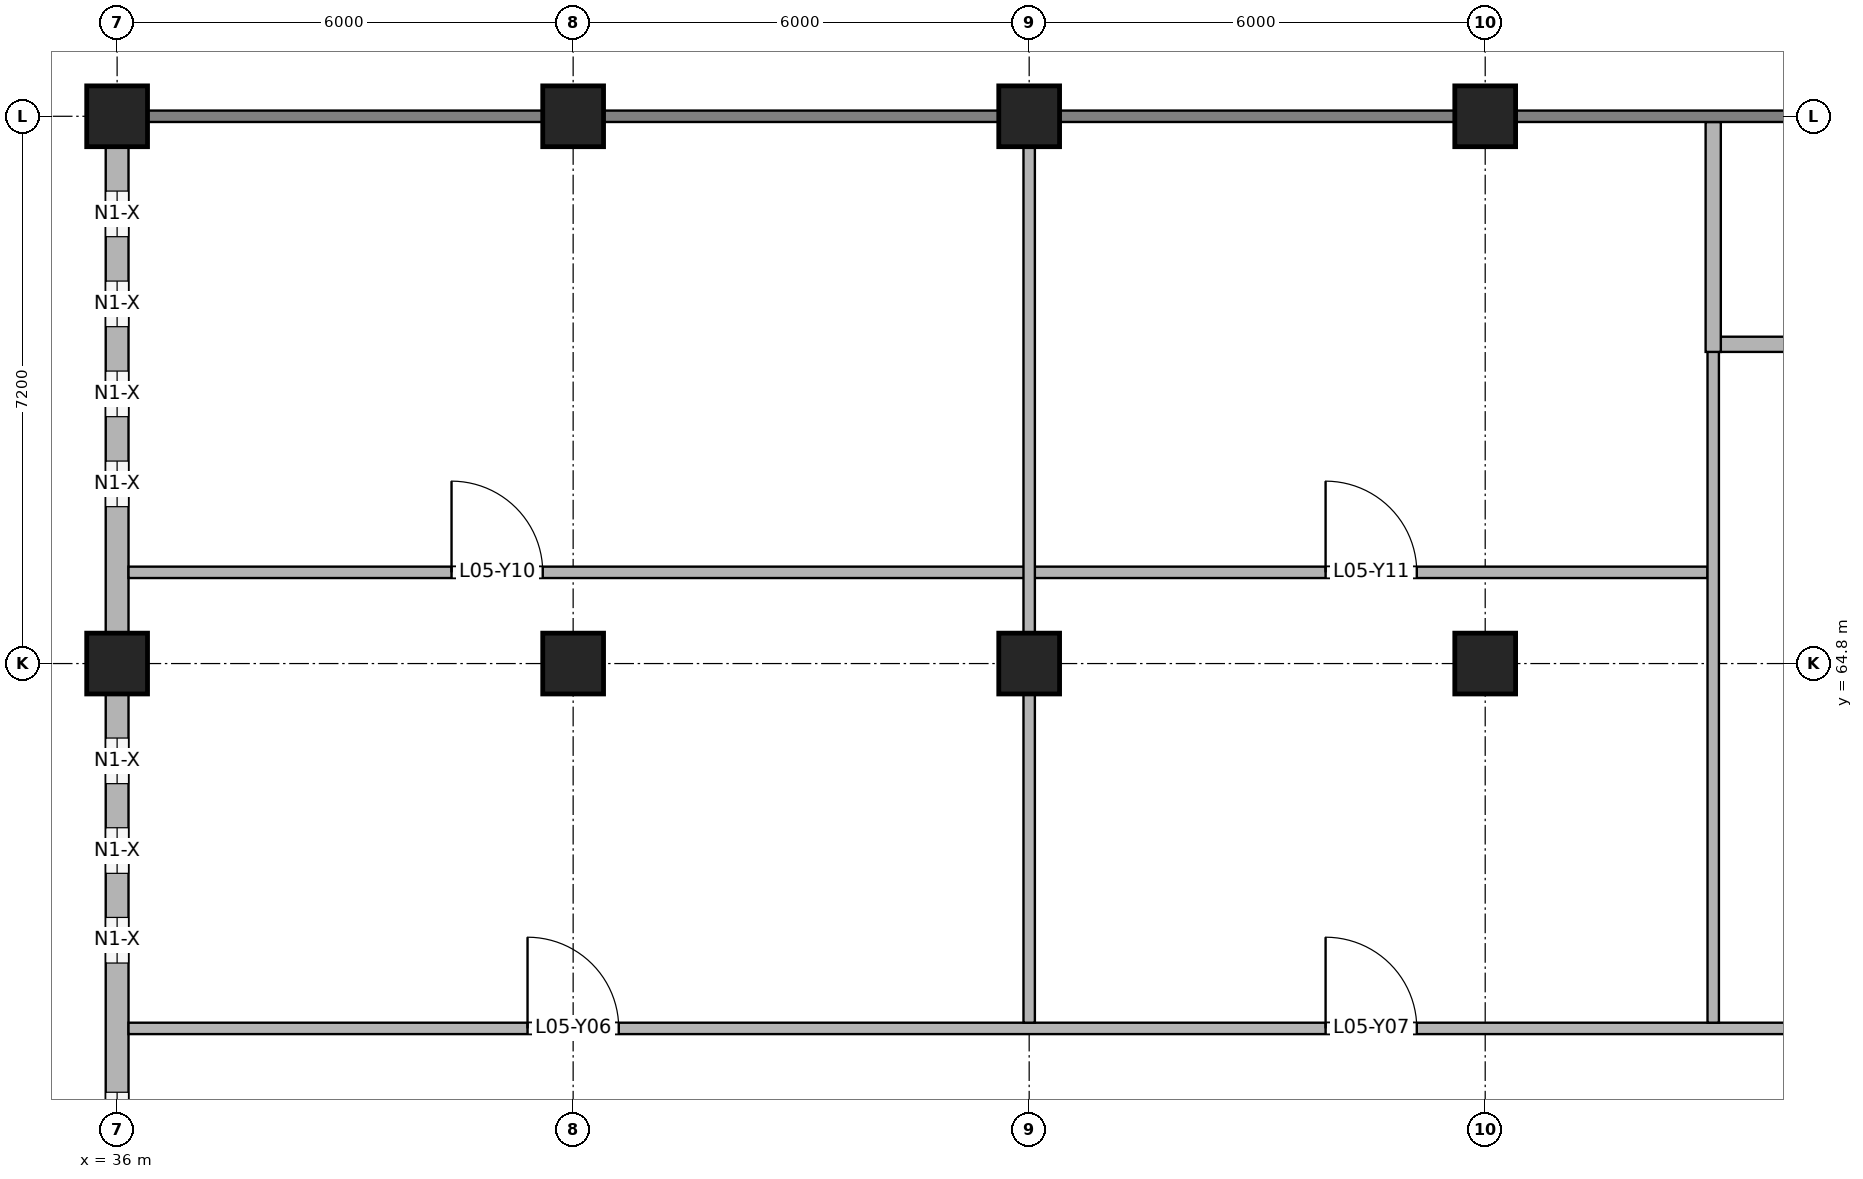
"""IFC4 building model, lengths in metres.
Left out: names, types, materials, properties, quantities, classifications, styles, units other than length and angle.
Written with IfcOpenShell. Run it as: python <this file> out.ifc"""

import sys

from ifc_helpers import new_model, si_unit, direction, frame, frame_2d, origin, origin_2d, place, context, subcontext, project, spatial, rectangle, extrude, element, fill, save


model = new_model("IFC4")
c1 = context("Model", 3, precision=1e-05, world=origin(), true_north=direction((0.0, 1.0)))
c2 = subcontext(c1, "Body", "Model", "MODEL_VIEW")
j1 = project(units=[si_unit("LENGTHUNIT", "METRE"), si_unit("PLANEANGLEUNIT", "RADIAN")], contexts=[c1])
p1 = place(None, origin())
s1 = spatial("IfcSite", under=j1, at=p1, CompositionType="ELEMENT")
p2 = place(p1, origin())
s2 = spatial("IfcBuilding", under=s1, at=p2, CompositionType="ELEMENT")
p3 = place(p2, frame((0.0, 0.0, 21.0)))
s3 = spatial("IfcBuildingStorey", under=s2, at=p3, CompositionType="ELEMENT", Elevation=21.0)
for number, where, z_axis, x_axis in (
    (1, (36.0, 64.8, 0.0), (0.0, 0.0, 1.0), (1.0, 0.0, 0.0)),
    (2, (42.0, 64.8, 0.0), (0.0, 0.0, 1.0), (1.0, 0.0, 0.0)),
    (3, (48.0, 64.8, 0.0), (0.0, 0.0, 1.0), (1.0, 0.0, 0.0)),
    (4, (54.0, 64.8, 0.0), (0.0, 0.0, 1.0), (1.0, 0.0, 0.0)),
    (5, (36.0, 72.0, 0.0), (0.0, 0.0, 1.0), (1.0, 0.0, 0.0)),
    (6, (42.0, 72.0, 0.0), (0.0, 0.0, 1.0), (1.0, 0.0, 0.0)),
    (7, (48.0, 72.0, 0.0), (0.0, 0.0, 1.0), (1.0, 0.0, 0.0)),
    (8, (54.0, 72.0, 0.0), (0.0, 0.0, 1.0), (1.0, 0.0, 0.0)),
):
    element("IfcColumn", number, at=place(p3, frame(where, z_axis=z_axis, x_axis=x_axis)), inside=s3, PredefinedType="COLUMN", context=c2, shape_type="SweptSolid", body=[
        extrude(rectangle(XDim=0.8, YDim=0.8, at=origin_2d()), origin(), (0.0, 0.0, 1.0), 3.95),
    ])
p4 = place(p3, frame((36.0, 58.0, 0.0), z_axis=(0.0, 0.0, 1.0), x_axis=(0.0, 1.0, 0.0)))
e9 = element("IfcWall", 9, at=p4, inside=s3, PredefinedType="SOLIDWALL", context=c2, shape_type="SweptSolid", body=[
    extrude(rectangle(XDim=6.4, YDim=0.3, at=frame_2d((3.2, 0.0))), origin(), (0.0, 0.0, 1.0), 3.15),
])
p5 = place(p4, frame((0.56, 0.0, 0.9)))
e10 = element("IfcOpeningElement", 10, at=p5, cuts=e9, PredefinedType="OPENING", context=c2, shape_type="SweptSolid", body=[
    extrude(rectangle(XDim=0.6, YDim=1.9, at=frame_2d((0.3, 0.95))), frame((0.0, 0.16, 0.0), z_axis=(0.0, -1.0, 0.0), x_axis=(1.0, 0.0, 0.0)), (0.0, 0.0, 1.0), 0.32),
])
p6 = place(p4, frame((2.86, 0.0, 0.9)))
e11 = element("IfcOpeningElement", 11, at=p6, cuts=e9, PredefinedType="OPENING", context=c2, shape_type="SweptSolid", body=[
    extrude(rectangle(XDim=0.6, YDim=1.9, at=frame_2d((0.3, 0.95))), frame((0.0, 0.16, 0.0), z_axis=(0.0, -1.0, 0.0), x_axis=(1.0, 0.0, 0.0)), (0.0, 0.0, 1.0), 0.32),
])
p7 = place(p4, frame((4.04, 0.0, 0.9)))
e12 = element("IfcOpeningElement", 12, at=p7, cuts=e9, PredefinedType="OPENING", context=c2, shape_type="SweptSolid", body=[
    extrude(rectangle(XDim=0.6, YDim=1.9, at=frame_2d((0.3, 0.95))), frame((0.0, 0.16, 0.0), z_axis=(0.0, -1.0, 0.0), x_axis=(1.0, 0.0, 0.0)), (0.0, 0.0, 1.0), 0.32),
])
p8 = place(p4, frame((5.22, 0.0, 0.9)))
e13 = element("IfcOpeningElement", 13, at=p8, cuts=e9, PredefinedType="OPENING", context=c2, shape_type="SweptSolid", body=[
    extrude(rectangle(XDim=0.6, YDim=1.9, at=frame_2d((0.3, 0.95))), frame((0.0, 0.16, 0.0), z_axis=(0.0, -1.0, 0.0), x_axis=(1.0, 0.0, 0.0)), (0.0, 0.0, 1.0), 0.32),
])
p9 = place(p3, frame((36.0, 65.2, 0.0), z_axis=(0.0, 0.0, 1.0), x_axis=(0.0, 1.0, 0.0)))
e14 = element("IfcWall", 14, at=p9, inside=s3, PredefinedType="SOLIDWALL", context=c2, shape_type="SweptSolid", body=[
    extrude(rectangle(XDim=6.4, YDim=0.3, at=frame_2d((3.2, 0.0))), origin(), (0.0, 0.0, 1.0), 3.15),
])
p10 = place(p9, frame((1.664, 0.0, 0.9)))
e15 = element("IfcOpeningElement", 15, at=p10, cuts=e14, PredefinedType="OPENING", context=c2, shape_type="SweptSolid", body=[
    extrude(rectangle(XDim=0.6, YDim=1.9, at=frame_2d((0.3, 0.95))), frame((0.0, 0.16, 0.0), z_axis=(0.0, -1.0, 0.0), x_axis=(1.0, 0.0, 0.0)), (0.0, 0.0, 1.0), 0.32),
])
p11 = place(p9, frame((2.848, 0.0, 0.9)))
e16 = element("IfcOpeningElement", 16, at=p11, cuts=e14, PredefinedType="OPENING", context=c2, shape_type="SweptSolid", body=[
    extrude(rectangle(XDim=0.6, YDim=1.9, at=frame_2d((0.3, 0.95))), frame((0.0, 0.16, 0.0), z_axis=(0.0, -1.0, 0.0), x_axis=(1.0, 0.0, 0.0)), (0.0, 0.0, 1.0), 0.32),
])
p12 = place(p9, frame((4.032, 0.0, 0.9)))
e17 = element("IfcOpeningElement", 17, at=p12, cuts=e14, PredefinedType="OPENING", context=c2, shape_type="SweptSolid", body=[
    extrude(rectangle(XDim=0.6, YDim=1.9, at=frame_2d((0.3, 0.95))), frame((0.0, 0.16, 0.0), z_axis=(0.0, -1.0, 0.0), x_axis=(1.0, 0.0, 0.0)), (0.0, 0.0, 1.0), 0.32),
])
p13 = place(p9, frame((5.216, 0.0, 0.9)))
e18 = element("IfcOpeningElement", 18, at=p13, cuts=e14, PredefinedType="OPENING", context=c2, shape_type="SweptSolid", body=[
    extrude(rectangle(XDim=0.6, YDim=1.9, at=frame_2d((0.3, 0.95))), frame((0.0, 0.16, 0.0), z_axis=(0.0, -1.0, 0.0), x_axis=(1.0, 0.0, 0.0)), (0.0, 0.0, 1.0), 0.32),
])
p14 = place(p3, frame((48.0, 60.075, 0.0), z_axis=(0.0, 0.0, 1.0), x_axis=(0.0, 1.0, 0.0)))
e19 = element("IfcWall", 19, at=p14, inside=s3, PredefinedType="PARTITIONING", context=c2, shape_type="SweptSolid", body=[
    extrude(rectangle(XDim=4.325, YDim=0.15, at=frame_2d((2.163, 0.0))), origin(), (0.0, 0.0, 1.0), 3.95),
])
p15 = place(p3, frame((48.0, 65.2, 0.0), z_axis=(0.0, 0.0, 1.0), x_axis=(0.0, 1.0, 0.0)))
e20 = element("IfcWall", 20, at=p15, inside=s3, PredefinedType="PARTITIONING", context=c2, shape_type="SweptSolid", body=[
    extrude(rectangle(XDim=6.4, YDim=0.15, at=frame_2d((3.2, 0.0))), origin(), (0.0, 0.0, 1.0), 3.15),
])
p16 = place(p3, frame((57.0, 60.075, 0.0), z_axis=(0.0, 0.0, 1.0), x_axis=(0.0, 1.0, 0.0)))
e21 = element("IfcWall", 21, at=p16, inside=s3, PredefinedType="PARTITIONING", context=c2, shape_type="SweptSolid", body=[
    extrude(rectangle(XDim=9.025, YDim=0.15, at=frame_2d((4.513, 0.0))), origin(), (0.0, 0.0, 1.0), 3.25),
])
p17 = place(p3, frame((57.0, 68.9, 0.0), z_axis=(0.0, 0.0, 1.0), x_axis=(0.0, 1.0, 0.0)))
e22 = element("IfcWall", 22, at=p17, inside=s3, PredefinedType="PARTITIONING", context=c2, shape_type="SweptSolid", body=[
    extrude(rectangle(XDim=3.025, YDim=0.2, at=frame_2d((1.513, 0.0))), origin(), (0.0, 0.0, 1.0), 3.25),
])
p18 = place(p3, frame((36.15, 60.0, 0.0), z_axis=(0.0, 0.0, 1.0), x_axis=(1.0, 0.0, 0.0)))
e23 = element("IfcWall", 23, at=p18, inside=s3, PredefinedType="PARTITIONING", context=c2, shape_type="SweptSolid", body=[
    extrude(rectangle(XDim=29.775, YDim=0.15, at=frame_2d((14.888, 0.0))), origin(), (0.0, 0.0, 1.0), 3.15),
])
p19 = place(p18, frame((5.25, 0.0, 0.0)))
e24 = element("IfcOpeningElement", 24, at=p19, cuts=e23, PredefinedType="OPENING", context=c2, shape_type="SweptSolid", body=[
    extrude(rectangle(XDim=1.2, YDim=2.1, at=frame_2d((0.6, 1.05))), frame((0.0, 0.085, 0.0), z_axis=(0.0, -1.0, 0.0), x_axis=(1.0, 0.0, 0.0)), (0.0, 0.0, 1.0), 0.17),
])
p20 = place(p18, frame((15.75, 0.0, 0.0)))
e25 = element("IfcOpeningElement", 25, at=p20, cuts=e23, PredefinedType="OPENING", context=c2, shape_type="SweptSolid", body=[
    extrude(rectangle(XDim=1.2, YDim=2.1, at=frame_2d((0.6, 1.05))), frame((0.0, 0.085, 0.0), z_axis=(0.0, -1.0, 0.0), x_axis=(1.0, 0.0, 0.0)), (0.0, 0.0, 1.0), 0.17),
])
p21 = place(p18, frame((24.75, 0.0, 0.0)))
e26 = element("IfcOpeningElement", 26, at=p21, cuts=e23, PredefinedType="OPENING", context=c2, shape_type="SweptSolid", body=[
    extrude(rectangle(XDim=1.2, YDim=2.1, at=frame_2d((0.6, 1.05))), frame((0.0, 0.085, 0.0), z_axis=(0.0, -1.0, 0.0), x_axis=(1.0, 0.0, 0.0)), (0.0, 0.0, 1.0), 0.17),
])
p22 = place(p3, frame((36.15, 66.0, 0.0), z_axis=(0.0, 0.0, 1.0), x_axis=(1.0, 0.0, 0.0)))
e27 = element("IfcWall", 27, at=p22, inside=s3, PredefinedType="PARTITIONING", context=c2, shape_type="SweptSolid", body=[
    extrude(rectangle(XDim=20.775, YDim=0.15, at=frame_2d((10.388, 0.0))), origin(), (0.0, 0.0, 1.0), 3.15),
])
p23 = place(p22, frame((4.25, 0.0, 0.0)))
e28 = element("IfcOpeningElement", 28, at=p23, cuts=e27, PredefinedType="OPENING", context=c2, shape_type="SweptSolid", body=[
    extrude(rectangle(XDim=1.2, YDim=2.1, at=frame_2d((0.6, 1.05))), frame((0.0, 0.085, 0.0), z_axis=(0.0, -1.0, 0.0), x_axis=(1.0, 0.0, 0.0)), (0.0, 0.0, 1.0), 0.17),
])
p24 = place(p22, frame((15.75, 0.0, 0.0)))
e29 = element("IfcOpeningElement", 29, at=p24, cuts=e27, PredefinedType="OPENING", context=c2, shape_type="SweptSolid", body=[
    extrude(rectangle(XDim=1.2, YDim=2.1, at=frame_2d((0.6, 1.05))), frame((0.0, 0.085, 0.0), z_axis=(0.0, -1.0, 0.0), x_axis=(1.0, 0.0, 0.0)), (0.0, 0.0, 1.0), 0.17),
])
p25 = place(p3, frame((57.1, 69.0, 0.0), z_axis=(0.0, 0.0, 1.0), x_axis=(1.0, 0.0, 0.0)))
e30 = element("IfcWall", 30, at=p25, inside=s3, PredefinedType="PARTITIONING", context=c2, shape_type="SweptSolid", body=[
    extrude(rectangle(XDim=8.9, YDim=0.2, at=frame_2d((4.45, 0.0))), origin(), (0.0, 0.0, 1.0), 3.15),
])
p26 = place(p25, frame((3.65, 0.0, 0.0)))
e31 = element("IfcOpeningElement", 31, at=p26, cuts=e30, PredefinedType="OPENING", context=c2, shape_type="SweptSolid", body=[
    extrude(rectangle(XDim=1.5, YDim=2.1, at=frame_2d((0.75, 1.05))), frame((0.0, 0.11, 0.0), z_axis=(0.0, -1.0, 0.0), x_axis=(1.0, 0.0, 0.0)), (0.0, 0.0, 1.0), 0.22),
])
p27 = place(p5, origin())
e32 = element("IfcWindow", 32, at=p27, inside=s3, PartitioningType="SINGLE_PANEL", PredefinedType="WINDOW", context=c2, shape_type="SweptSolid", body=[
    extrude(rectangle(XDim=0.6, YDim=1.9, at=frame_2d((0.3, 0.95))), frame((0.0, 0.03, 0.0), z_axis=(0.0, -1.0, 0.0), x_axis=(1.0, 0.0, 0.0)), (0.0, 0.0, 1.0), 0.06),
])
fill(e10, e32)
p28 = place(p6, origin())
e33 = element("IfcWindow", 33, at=p28, inside=s3, PartitioningType="SINGLE_PANEL", PredefinedType="WINDOW", context=c2, shape_type="SweptSolid", body=[
    extrude(rectangle(XDim=0.6, YDim=1.9, at=frame_2d((0.3, 0.95))), frame((0.0, 0.03, 0.0), z_axis=(0.0, -1.0, 0.0), x_axis=(1.0, 0.0, 0.0)), (0.0, 0.0, 1.0), 0.06),
])
fill(e11, e33)
p29 = place(p7, origin())
e34 = element("IfcWindow", 34, at=p29, inside=s3, PartitioningType="SINGLE_PANEL", PredefinedType="WINDOW", context=c2, shape_type="SweptSolid", body=[
    extrude(rectangle(XDim=0.6, YDim=1.9, at=frame_2d((0.3, 0.95))), frame((0.0, 0.03, 0.0), z_axis=(0.0, -1.0, 0.0), x_axis=(1.0, 0.0, 0.0)), (0.0, 0.0, 1.0), 0.06),
])
fill(e12, e34)
p30 = place(p8, origin())
e35 = element("IfcWindow", 35, at=p30, inside=s3, PartitioningType="SINGLE_PANEL", PredefinedType="WINDOW", context=c2, shape_type="SweptSolid", body=[
    extrude(rectangle(XDim=0.6, YDim=1.9, at=frame_2d((0.3, 0.95))), frame((0.0, 0.03, 0.0), z_axis=(0.0, -1.0, 0.0), x_axis=(1.0, 0.0, 0.0)), (0.0, 0.0, 1.0), 0.06),
])
fill(e13, e35)
p31 = place(p10, origin())
e36 = element("IfcWindow", 36, at=p31, inside=s3, PartitioningType="SINGLE_PANEL", PredefinedType="WINDOW", context=c2, shape_type="SweptSolid", body=[
    extrude(rectangle(XDim=0.6, YDim=1.9, at=frame_2d((0.3, 0.95))), frame((0.0, 0.03, 0.0), z_axis=(0.0, -1.0, 0.0), x_axis=(1.0, 0.0, 0.0)), (0.0, 0.0, 1.0), 0.06),
])
fill(e15, e36)
p32 = place(p11, origin())
e37 = element("IfcWindow", 37, at=p32, inside=s3, PartitioningType="SINGLE_PANEL", PredefinedType="WINDOW", context=c2, shape_type="SweptSolid", body=[
    extrude(rectangle(XDim=0.6, YDim=1.9, at=frame_2d((0.3, 0.95))), frame((0.0, 0.03, 0.0), z_axis=(0.0, -1.0, 0.0), x_axis=(1.0, 0.0, 0.0)), (0.0, 0.0, 1.0), 0.06),
])
fill(e16, e37)
p33 = place(p12, origin())
e38 = element("IfcWindow", 38, at=p33, inside=s3, PartitioningType="SINGLE_PANEL", PredefinedType="WINDOW", context=c2, shape_type="SweptSolid", body=[
    extrude(rectangle(XDim=0.6, YDim=1.9, at=frame_2d((0.3, 0.95))), frame((0.0, 0.03, 0.0), z_axis=(0.0, -1.0, 0.0), x_axis=(1.0, 0.0, 0.0)), (0.0, 0.0, 1.0), 0.06),
])
fill(e17, e38)
p34 = place(p13, origin())
e39 = element("IfcWindow", 39, at=p34, inside=s3, PartitioningType="SINGLE_PANEL", PredefinedType="WINDOW", context=c2, shape_type="SweptSolid", body=[
    extrude(rectangle(XDim=0.6, YDim=1.9, at=frame_2d((0.3, 0.95))), frame((0.0, 0.03, 0.0), z_axis=(0.0, -1.0, 0.0), x_axis=(1.0, 0.0, 0.0)), (0.0, 0.0, 1.0), 0.06),
])
fill(e18, e39)
p35 = place(p19, origin())
e40 = element("IfcDoor", 40, at=p35, inside=s3, OperationType="SINGLE_SWING_LEFT", PredefinedType="DOOR", context=c2, shape_type="SweptSolid", body=[
    extrude(rectangle(XDim=1.2, YDim=2.1, at=frame_2d((0.6, 1.05))), frame((0.0, 0.025, 0.0), z_axis=(0.0, -1.0, 0.0), x_axis=(1.0, 0.0, 0.0)), (0.0, 0.0, 1.0), 0.05),
])
fill(e24, e40)
p36 = place(p20, origin())
e41 = element("IfcDoor", 41, at=p36, inside=s3, OperationType="SINGLE_SWING_LEFT", PredefinedType="DOOR", context=c2, shape_type="SweptSolid", body=[
    extrude(rectangle(XDim=1.2, YDim=2.1, at=frame_2d((0.6, 1.05))), frame((0.0, 0.025, 0.0), z_axis=(0.0, -1.0, 0.0), x_axis=(1.0, 0.0, 0.0)), (0.0, 0.0, 1.0), 0.05),
])
fill(e25, e41)
p37 = place(p23, origin())
e42 = element("IfcDoor", 42, at=p37, inside=s3, OperationType="SINGLE_SWING_LEFT", PredefinedType="DOOR", context=c2, shape_type="SweptSolid", body=[
    extrude(rectangle(XDim=1.2, YDim=2.1, at=frame_2d((0.6, 1.05))), frame((0.0, 0.025, 0.0), z_axis=(0.0, -1.0, 0.0), x_axis=(1.0, 0.0, 0.0)), (0.0, 0.0, 1.0), 0.05),
])
fill(e28, e42)
p38 = place(p24, origin())
e43 = element("IfcDoor", 43, at=p38, inside=s3, OperationType="SINGLE_SWING_LEFT", PredefinedType="DOOR", context=c2, shape_type="SweptSolid", body=[
    extrude(rectangle(XDim=1.2, YDim=2.1, at=frame_2d((0.6, 1.05))), frame((0.0, 0.025, 0.0), z_axis=(0.0, -1.0, 0.0), x_axis=(1.0, 0.0, 0.0)), (0.0, 0.0, 1.0), 0.05),
])
fill(e29, e43)
save(model, sys.argv[1])
